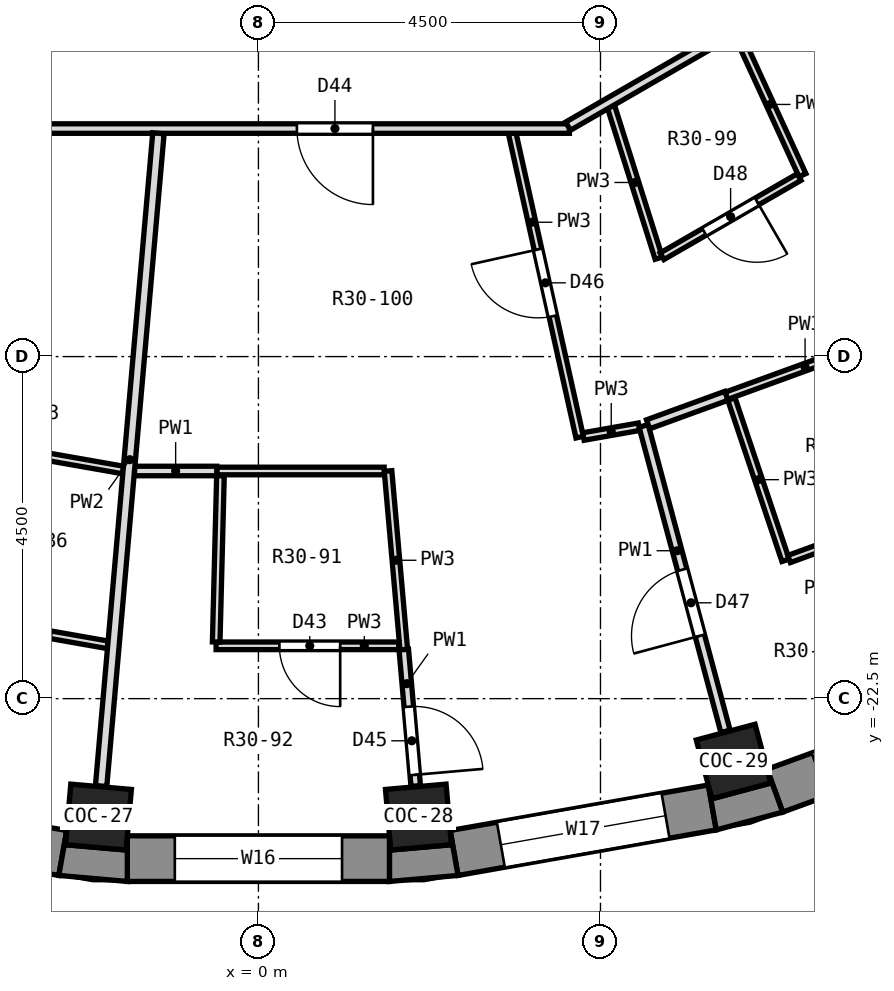
"""IFC4 building model, lengths in metres.
Left out: names, types, materials, properties, quantities, classifications, styles, units other than length and angle.
Written with IfcOpenShell. Run it as: python <this file> out.ifc"""

import sys

from ifc_helpers import new_model, si_unit, direction, frame, frame_2d, origin, origin_2d, place, context, subcontext, project, spatial, polyline, rectangle, outline, extrude, element, fill, save


model = new_model("IFC4")
c1 = context("Model", 3, precision=1e-05, world=origin(), true_north=direction((0.0, 1.0)))
c2 = subcontext(c1, "Body", "Model", "MODEL_VIEW")
j1 = project(units=[si_unit("LENGTHUNIT", "METRE"), si_unit("PLANEANGLEUNIT", "RADIAN")], contexts=[c1])
p1 = place(None, origin())
s1 = spatial("IfcSite", under=j1, at=p1, CompositionType="ELEMENT")
p2 = place(p1, origin())
s2 = spatial("IfcBuilding", under=s1, at=p2, CompositionType="ELEMENT")
p3 = place(p2, frame((0.0, 0.0, 210.3)))
s3 = spatial("IfcBuildingStorey", under=s2, at=p3, CompositionType="ELEMENT", Elevation=210.3)
for number, where, z_axis, x_axis in (
    (1, (-2.105, -24.058, 0.0), (0.0, 0.0, 1.0), (-0.087, -0.996, 0.0)),
    (2, (2.105, -24.058, 0.0), (0.0, 0.0, 1.0), (0.087, -0.996, 0.0)),
    (3, (6.25, -23.327, 0.0), (0.0, 0.0, 1.0), (0.259, -0.966, 0.0)),
):
    element("IfcColumn", number, at=place(p3, frame(where, z_axis=z_axis, x_axis=x_axis)), inside=s3, PredefinedType="COLUMN", context=c2, shape_type="SweptSolid", body=[
        extrude(rectangle(XDim=0.8, YDim=0.8, at=origin_2d()), origin(), (0.0, 0.0, 1.0), 3.3),
    ])
p4 = place(p3, frame((-5.971, -23.932, 0.0), z_axis=(0.0, 0.0, 1.0), x_axis=(0.984814892183, -0.173607684551, 0.0)))
e4 = element("IfcWall", 4, at=p4, inside=s3, PredefinedType="SOLIDWALL", context=c2, shape_type="SweptSolid", body=[
    extrude(rectangle(XDim=3.45, YDim=0.6, at=frame_2d((1.725, 0.0))), origin(), (0.0, 0.0, 1.0), 2.85),
])
p5 = place(p4, frame((0.625, 0.0, 0.9)))
e5 = element("IfcOpeningElement", 5, at=p5, cuts=e4, PredefinedType="OPENING", context=c2, shape_type="SweptSolid", body=[
    extrude(rectangle(XDim=2.2, YDim=1.8, at=frame_2d((1.1, 0.9))), frame((0.0, 0.312, 0.0), z_axis=(0.0, -1.0, 0.0), x_axis=(1.0, 0.0, 0.0)), (0.0, 0.0, 1.0), 0.624),
])
p6 = place(p3, frame((-1.725, -24.605, 0.0), z_axis=(0.0, 0.0, 1.0), x_axis=(1.0, 0.0, 0.0)))
e6 = element("IfcWall", 6, at=p6, inside=s3, PredefinedType="SOLIDWALL", context=c2, shape_type="SweptSolid", body=[
    extrude(rectangle(XDim=3.45, YDim=0.6, at=frame_2d((1.725, 0.0))), origin(), (0.0, 0.0, 1.0), 2.85),
])
p7 = place(p6, frame((0.625, 0.0, 0.9)))
e7 = element("IfcOpeningElement", 7, at=p7, cuts=e6, PredefinedType="OPENING", context=c2, shape_type="SweptSolid", body=[
    extrude(rectangle(XDim=2.2, YDim=1.8, at=frame_2d((1.1, 0.9))), frame((0.0, 0.312, 0.0), z_axis=(0.0, -1.0, 0.0), x_axis=(1.0, 0.0, 0.0)), (0.0, 0.0, 1.0), 0.624),
])
p8 = place(p3, frame((2.574, -24.531, 0.0), z_axis=(0.0, 0.0, 1.0), x_axis=(0.984814892183, 0.173607684551, 0.0)))
e8 = element("IfcWall", 8, at=p8, inside=s3, PredefinedType="SOLIDWALL", context=c2, shape_type="SweptSolid", body=[
    extrude(rectangle(XDim=3.45, YDim=0.6, at=frame_2d((1.725, 0.0))), origin(), (0.0, 0.0, 1.0), 2.85),
])
p9 = place(p8, frame((0.625, 0.0, 0.9)))
e9 = element("IfcOpeningElement", 9, at=p9, cuts=e8, PredefinedType="OPENING", context=c2, shape_type="SweptSolid", body=[
    extrude(rectangle(XDim=2.2, YDim=1.8, at=frame_2d((1.1, 0.9))), frame((0.0, 0.312, 0.0), z_axis=(0.0, -1.0, 0.0), x_axis=(1.0, 0.0, 0.0)), (0.0, 0.0, 1.0), 0.624),
])
p10 = place(p3, frame((6.794, -23.711, 0.0), z_axis=(0.0, 0.0, 1.0), x_axis=(0.93968799822, 0.342032843455, 0.0)))
e10 = element("IfcWall", 10, at=p10, inside=s3, PredefinedType="SOLIDWALL", context=c2, shape_type="SweptSolid", body=[
    extrude(rectangle(XDim=3.45, YDim=0.6, at=frame_2d((1.725, 0.0))), origin(), (0.0, 0.0, 1.0), 2.85),
])
p11 = place(p10, frame((0.625, 0.0, 0.9)))
e11 = element("IfcOpeningElement", 11, at=p11, cuts=e10, PredefinedType="OPENING", context=c2, shape_type="SweptSolid", body=[
    extrude(rectangle(XDim=2.2, YDim=1.8, at=frame_2d((1.1, 0.9))), frame((0.0, 0.312, 0.0), z_axis=(0.0, -1.0, 0.0), x_axis=(1.0, 0.0, 0.0)), (0.0, 0.0, 1.0), 0.624),
])
p12 = place(p3, origin())
e12 = element("IfcWall", 12, at=p12, inside=s3, PredefinedType="SOLIDWALL", context=c2, shape_type="SweptSolid", body=[
    extrude(outline(polyline([(-2.626, -24.826), (-1.725, -24.905), (-1.725, -24.305), (-1.741, -24.491), (-2.538, -24.422), (-2.522, -24.235), (-2.626, -24.826)])), origin(), (0.0, 0.0, 1.0), 2.85),
])
p13 = place(p3, origin())
e13 = element("IfcWall", 13, at=p13, inside=s3, PredefinedType="SOLIDWALL", context=c2, shape_type="SweptSolid", body=[
    extrude(outline(polyline([(1.725, -24.905), (2.626, -24.826), (2.522, -24.235), (2.538, -24.422), (1.741, -24.491), (1.725, -24.305), (1.725, -24.905)])), origin(), (0.0, 0.0, 1.0), 2.85),
])
p14 = place(p3, origin())
e14 = element("IfcWall", 14, at=p14, inside=s3, PredefinedType="SOLIDWALL", context=c2, shape_type="SweptSolid", body=[
    extrude(outline(polyline([(6.023, -24.227), (6.897, -23.993), (6.692, -23.429), (6.74, -23.61), (5.968, -23.817), (5.919, -23.636), (6.023, -24.227)])), origin(), (0.0, 0.0, 1.0), 2.85),
])
p15 = place(p3, frame((1.705, -19.505, 0.0), z_axis=(0.0, 0.0, 1.0), x_axis=(0.087875685813, -0.996131449078, 0.0)))
e15 = element("IfcWall", 15, at=p15, inside=s3, PredefinedType="PARTITIONING", context=c2, shape_type="SweptSolid", body=[
    extrude(rectangle(XDim=2.359, YDim=0.1, at=frame_2d((1.179, 0.0))), origin(), (0.0, 0.0, 1.0), 2.85),
])
p16 = place(p3, frame((1.912, -21.855, 0.0), z_axis=(0.0, 0.0, 1.0), x_axis=(0.08726107822, -0.99618547682, 0.0)))
e16 = element("IfcWall", 16, at=p16, inside=s3, PredefinedType="PARTITIONING", context=c2, shape_type="SweptSolid", body=[
    extrude(rectangle(XDim=1.802, YDim=0.125, at=frame_2d((0.901, 0.0))), origin(), (0.0, 0.0, 1.0), 2.85),
])
p17 = place(p16, frame((0.754, 0.0, 0.0)))
e17 = element("IfcOpeningElement", 17, at=p17, cuts=e16, PredefinedType="OPENING", context=c2, shape_type="SweptSolid", body=[
    extrude(rectangle(XDim=0.9, YDim=2.1, at=frame_2d((0.45, 1.05))), frame((0.0, 0.074, 0.0), z_axis=(0.0, -1.0, 0.0), x_axis=(1.0, 0.0, 0.0)), (0.0, 0.0, 1.0), 0.149),
])
p18 = place(p3, frame((3.338, -15.061, 0.0), z_axis=(0.0, 0.0, 1.0), x_axis=(0.216772684832, -0.976222107469, 0.0)))
e18 = element("IfcWall", 18, at=p18, inside=s3, PredefinedType="PARTITIONING", context=c2, shape_type="SweptSolid", body=[
    extrude(rectangle(XDim=4.096, YDim=0.1, at=frame_2d((2.048, 0.0))), origin(), (0.0, 0.0, 1.0), 2.85),
])
p19 = place(p18, frame((1.566, 0.0, 0.0)))
e19 = element("IfcOpeningElement", 19, at=p19, cuts=e18, PredefinedType="OPENING", context=c2, shape_type="SweptSolid", body=[
    extrude(rectangle(XDim=0.9, YDim=2.1, at=frame_2d((0.45, 1.05))), frame((0.0, 0.062, 0.0), z_axis=(0.0, -1.0, 0.0), x_axis=(1.0, 0.0, 0.0)), (0.0, 0.0, 1.0), 0.124),
])
p20 = place(p3, frame((5.068, -18.912, 0.0), z_axis=(0.0, 0.0, 1.0), x_axis=(0.258780082079, -0.965936265557, 0.0)))
e20 = element("IfcWall", 20, at=p20, inside=s3, PredefinedType="PARTITIONING", context=c2, shape_type="SweptSolid", body=[
    extrude(rectangle(XDim=4.16, YDim=0.125, at=frame_2d((2.08, 0.0))), origin(), (0.0, 0.0, 1.0), 2.85),
])
p21 = place(p20, frame((1.959, 0.0, 0.0)))
e21 = element("IfcOpeningElement", 21, at=p21, cuts=e20, PredefinedType="OPENING", context=c2, shape_type="SweptSolid", body=[
    extrude(rectangle(XDim=0.9, YDim=2.1, at=frame_2d((0.45, 1.05))), frame((0.0, 0.074, 0.0), z_axis=(0.0, -1.0, 0.0), x_axis=(1.0, 0.0, 0.0)), (0.0, 0.0, 1.0), 0.149),
])
p22 = place(p3, frame((4.639, -14.713, 0.0), z_axis=(0.0, 0.0, 1.0), x_axis=(0.300689491928, -0.953722092354, 0.0)))
e22 = element("IfcWall", 22, at=p22, inside=s3, PredefinedType="PARTITIONING", context=c2, shape_type="SweptSolid", body=[
    extrude(rectangle(XDim=2.089, YDim=0.1, at=frame_2d((1.044, 0.0))), origin(), (0.0, 0.0, 1.0), 2.85),
])
p23 = place(p3, frame((6.223, -18.558, 0.0), z_axis=(0.0, 0.0, 1.0), x_axis=(0.318223462583, -0.948015731864, 0.0)))
e23 = element("IfcWall", 23, at=p23, inside=s3, PredefinedType="PARTITIONING", context=c2, shape_type="SweptSolid", body=[
    extrude(rectangle(XDim=2.238, YDim=0.1, at=frame_2d((1.119, 0.0))), origin(), (0.0, 0.0, 1.0), 2.85),
])
p24 = place(p3, frame((6.304, -13.753, 0.0), z_axis=(0.0, 0.0, 1.0), x_axis=(0.41684777826, -0.90897630869, 0.0)))
e24 = element("IfcWall", 24, at=p24, inside=s3, PredefinedType="PARTITIONING", context=c2, shape_type="SweptSolid", body=[
    extrude(rectangle(XDim=2.046, YDim=0.1, at=frame_2d((1.023, 0.0))), origin(), (0.0, 0.0, 1.0), 2.85),
])
p25 = place(p3, frame((-4.335, -21.377, 0.0), z_axis=(0.0, 0.0, 1.0), x_axis=(0.984797956456, -0.173703727534, 0.0)))
e25 = element("IfcWall", 25, at=p25, inside=s3, PredefinedType="PARTITIONING", context=c2, shape_type="SweptSolid", body=[
    extrude(rectangle(XDim=2.389, YDim=0.1, at=frame_2d((1.195, 0.0))), origin(), (0.0, 0.0, 1.0), 2.85),
])
p26 = place(p25, frame((0.832, 0.0, 0.0)))
e26 = element("IfcOpeningElement", 26, at=p26, cuts=e25, PredefinedType="OPENING", context=c2, shape_type="SweptSolid", body=[
    extrude(rectangle(XDim=0.8, YDim=2.1, at=frame_2d((0.4, 1.05))), frame((0.0, 0.062, 0.0), z_axis=(0.0, -1.0, 0.0), x_axis=(1.0, 0.0, 0.0)), (0.0, 0.0, 1.0), 0.124),
])
p27 = place(p3, frame((-3.927, -19.115, 0.0), z_axis=(0.0, 0.0, 1.0), x_axis=(0.984911838823, -0.173056839643, 0.0)))
e27 = element("IfcWall", 27, at=p27, inside=s3, PredefinedType="PARTITIONING", context=c2, shape_type="SweptSolid", body=[
    extrude(rectangle(XDim=2.18, YDim=0.1, at=frame_2d((1.09, 0.0))), origin(), (0.0, 0.0, 1.0), 2.85),
])
p28 = place(p3, frame((-0.557, -21.805, 0.0), z_axis=(0.0, 0.0, 1.0), x_axis=(1.0, 0.0, 0.0)))
e28 = element("IfcWall", 28, at=p28, inside=s3, PredefinedType="PARTITIONING", context=c2, shape_type="SweptSolid", body=[
    extrude(rectangle(XDim=2.402, YDim=0.1, at=frame_2d((1.201, 0.0))), origin(), (0.0, 0.0, 1.0), 2.85),
])
p29 = place(p28, frame((0.833, 0.0, 0.0)))
e29 = element("IfcOpeningElement", 29, at=p29, cuts=e28, PredefinedType="OPENING", context=c2, shape_type="SweptSolid", body=[
    extrude(rectangle(XDim=0.8, YDim=2.1, at=frame_2d((0.4, 1.05))), frame((0.0, 0.062, 0.0), z_axis=(0.0, -1.0, 0.0), x_axis=(1.0, 0.0, 0.0)), (0.0, 0.0, 1.0), 0.124),
])
p30 = place(p3, frame((-0.548, -19.505, 0.0), z_axis=(0.0, 0.0, 1.0), x_axis=(1.0, 0.0, 0.0)))
e30 = element("IfcWall", 30, at=p30, inside=s3, PredefinedType="PARTITIONING", context=c2, shape_type="SweptSolid", body=[
    extrude(rectangle(XDim=2.202, YDim=0.1, at=frame_2d((1.101, 0.0))), origin(), (0.0, 0.0, 1.0), 2.85),
])
p31 = place(p3, frame((-1.63, -19.505, 0.0), z_axis=(0.0, 0.0, 1.0), x_axis=(1.0, 0.0, 0.0)))
e31 = element("IfcWall", 31, at=p31, inside=s3, PredefinedType="PARTITIONING", context=c2, shape_type="SweptSolid", body=[
    extrude(rectangle(XDim=1.082, YDim=0.125, at=frame_2d((0.541, 0.0))), origin(), (0.0, 0.0, 1.0), 2.85),
])
p32 = place(p3, frame((-3.957, -15.0, 0.0), z_axis=(0.0, 0.0, 1.0), x_axis=(1.0, 0.0, 0.0)))
e32 = element("IfcWall", 32, at=p32, inside=s3, PredefinedType="PARTITIONING", context=c2, shape_type="SweptSolid", body=[
    extrude(rectangle(XDim=8.048, YDim=0.125, at=frame_2d((4.024, 0.0))), origin(), (0.0, 0.0, 1.0), 2.85),
])
p33 = place(p32, frame((4.463, 0.0, 0.0)))
e33 = element("IfcOpeningElement", 33, at=p33, cuts=e32, PredefinedType="OPENING", context=c2, shape_type="SweptSolid", body=[
    extrude(rectangle(XDim=1.0, YDim=2.1, at=frame_2d((0.5, 1.05))), frame((0.0, 0.074, 0.0), z_axis=(0.0, -1.0, 0.0), x_axis=(1.0, 0.0, 0.0)), (0.0, 0.0, 1.0), 0.149),
])
p34 = place(p3, frame((4.276, -19.052, 0.0), z_axis=(0.0, 0.0, 1.0), x_axis=(0.984820011125, 0.173578644101, 0.0)))
e34 = element("IfcWall", 34, at=p34, inside=s3, PredefinedType="PARTITIONING", context=c2, shape_type="SweptSolid", body=[
    extrude(rectangle(XDim=0.741, YDim=0.1, at=frame_2d((0.371, 0.0))), origin(), (0.0, 0.0, 1.0), 2.85),
])
p35 = place(p3, frame((6.982, -20.663, 0.0), z_axis=(0.0, 0.0, 1.0), x_axis=(0.939639539443, 0.34216594792, 0.0)))
e35 = element("IfcWall", 35, at=p35, inside=s3, PredefinedType="PARTITIONING", context=c2, shape_type="SweptSolid", body=[
    extrude(rectangle(XDim=2.364, YDim=0.1, at=frame_2d((1.182, 0.0))), origin(), (0.0, 0.0, 1.0), 2.85),
])
p36 = place(p35, frame((0.782, 0.0, 0.0)))
e36 = element("IfcOpeningElement", 36, at=p36, cuts=e35, PredefinedType="OPENING", context=c2, shape_type="SweptSolid", body=[
    extrude(rectangle(XDim=0.8, YDim=2.1, at=frame_2d((0.4, 1.05))), frame((0.0, 0.062, 0.0), z_axis=(0.0, -1.0, 0.0), x_axis=(1.0, 0.0, 0.0)), (0.0, 0.0, 1.0), 0.124),
])
p37 = place(p3, frame((6.156, -18.516, 0.0), z_axis=(0.0, 0.0, 1.0), x_axis=(0.939728749343, 0.341920864613, 0.0)))
e37 = element("IfcWall", 37, at=p37, inside=s3, PredefinedType="PARTITIONING", context=c2, shape_type="SweptSolid", body=[
    extrude(rectangle(XDim=2.205, YDim=0.1, at=frame_2d((1.103, 0.0))), origin(), (0.0, 0.0, 1.0), 2.85),
])
p38 = place(p3, frame((5.127, -18.891, 0.0), z_axis=(0.0, 0.0, 1.0), x_axis=(0.939656692784, 0.342118838573, 0.0)))
e38 = element("IfcWall", 38, at=p38, inside=s3, PredefinedType="PARTITIONING", context=c2, shape_type="SweptSolid", body=[
    extrude(rectangle(XDim=1.095, YDim=0.125, at=frame_2d((0.548, 0.0))), origin(), (0.0, 0.0, 1.0), 2.85),
])
p39 = place(p3, frame((5.31, -16.68, 0.0), z_axis=(0.0, 0.0, 1.0), x_axis=(0.865867329874, 0.500273692149, 0.0)))
e39 = element("IfcWall", 39, at=p39, inside=s3, PredefinedType="PARTITIONING", context=c2, shape_type="SweptSolid", body=[
    extrude(rectangle(XDim=2.083, YDim=0.1, at=frame_2d((1.042, 0.0))), origin(), (0.0, 0.0, 1.0), 2.85),
])
p40 = place(p39, frame((0.641, 0.0, 0.0)))
e40 = element("IfcOpeningElement", 40, at=p40, cuts=e39, PredefinedType="OPENING", context=c2, shape_type="SweptSolid", body=[
    extrude(rectangle(XDim=0.8, YDim=2.1, at=frame_2d((0.4, 1.05))), frame((0.0, 0.062, 0.0), z_axis=(0.0, -1.0, 0.0), x_axis=(1.0, 0.0, 0.0)), (0.0, 0.0, 1.0), 0.124),
])
p41 = place(p3, frame((4.073, -14.969, 0.0), z_axis=(0.0, 0.0, 1.0), x_axis=(0.866056845741, 0.499945536979, 0.0)))
e41 = element("IfcWall", 41, at=p41, inside=s3, PredefinedType="PARTITIONING", context=c2, shape_type="SweptSolid", body=[
    extrude(rectangle(XDim=7.926, YDim=0.125, at=frame_2d((3.963, 0.0))), origin(), (0.0, 0.0, 1.0), 2.85),
])
p42 = place(p3, frame((-2.07, -23.65, 0.0), z_axis=(0.0, 0.0, 1.0), x_axis=(0.087486308122, 0.996165722102, 0.0)))
e42 = element("IfcWall", 42, at=p42, inside=s3, PredefinedType="PARTITIONING", context=c2, shape_type="SweptSolid", body=[
    extrude(rectangle(XDim=8.62, YDim=0.15, at=frame_2d((4.31, 0.0))), origin(), (0.0, 0.0, 1.0), 2.85),
])
p43 = place(p3, frame((-0.556, -21.755, 0.0), z_axis=(0.0, 0.0, 1.0), x_axis=(0.025658328011, 0.999670770906, 0.0)))
e43 = element("IfcWall", 43, at=p43, inside=s3, PredefinedType="PARTITIONING", context=c2, shape_type="SweptSolid", body=[
    extrude(rectangle(XDim=2.188, YDim=0.1, at=frame_2d((1.094, 0.0))), origin(), (0.0, 0.0, 1.0), 2.85),
])
p44 = place(p7, origin())
e44 = element("IfcWindow", 44, at=p44, inside=s3, PartitioningType="SINGLE_PANEL", PredefinedType="WINDOW", context=c2, shape_type="SweptSolid", body=[
    extrude(rectangle(XDim=2.2, YDim=1.8, at=frame_2d((1.1, 0.9))), frame((0.0, 0.18, 0.0), z_axis=(0.0, -1.0, 0.0), x_axis=(1.0, 0.0, 0.0)), (0.0, 0.0, 1.0), 0.06),
])
fill(e7, e44)
p45 = place(p9, origin())
e45 = element("IfcWindow", 45, at=p45, inside=s3, PartitioningType="SINGLE_PANEL", PredefinedType="WINDOW", context=c2, shape_type="SweptSolid", body=[
    extrude(rectangle(XDim=2.2, YDim=1.8, at=frame_2d((1.1, 0.9))), frame((0.0, 0.18, 0.0), z_axis=(0.0, -1.0, 0.0), x_axis=(1.0, 0.0, 0.0)), (0.0, 0.0, 1.0), 0.06),
])
fill(e9, e45)
p46 = place(p29, frame((0.8, 0.0, 0.0), z_axis=(0.0, 0.0, 1.0), x_axis=(-1.0, 0.0, 0.0)))
e46 = element("IfcDoor", 46, at=p46, inside=s3, OperationType="SINGLE_SWING_LEFT", PredefinedType="DOOR", context=c2, shape_type="SweptSolid", body=[
    extrude(rectangle(XDim=0.8, YDim=2.1, at=frame_2d((0.4, 1.05))), frame((0.0, 0.025, 0.0), z_axis=(0.0, -1.0, 0.0), x_axis=(1.0, 0.0, 0.0)), (0.0, 0.0, 1.0), 0.05),
])
fill(e29, e46)
p47 = place(p33, frame((1.0, 0.0, 0.0), z_axis=(0.0, 0.0, 1.0), x_axis=(-1.0, 0.0, 0.0)))
e47 = element("IfcDoor", 47, at=p47, inside=s3, OperationType="SINGLE_SWING_LEFT", PredefinedType="DOOR", context=c2, shape_type="SweptSolid", body=[
    extrude(rectangle(XDim=1.0, YDim=2.1, at=frame_2d((0.5, 1.05))), frame((0.0, 0.025, 0.0), z_axis=(0.0, -1.0, 0.0), x_axis=(1.0, 0.0, 0.0)), (0.0, 0.0, 1.0), 0.05),
])
fill(e33, e47)
p48 = place(p17, origin())
e48 = element("IfcDoor", 48, at=p48, inside=s3, OperationType="SINGLE_SWING_RIGHT", PredefinedType="DOOR", context=c2, shape_type="SweptSolid", body=[
    extrude(rectangle(XDim=0.9, YDim=2.1, at=frame_2d((0.45, 1.05))), frame((0.0, 0.025, 0.0), z_axis=(0.0, -1.0, 0.0), x_axis=(1.0, 0.0, 0.0)), (0.0, 0.0, 1.0), 0.05),
])
fill(e17, e48)
p49 = place(p19, frame((0.9, 0.0, 0.0), z_axis=(0.0, 0.0, 1.0), x_axis=(-1.0, 0.0, 0.0)))
e49 = element("IfcDoor", 49, at=p49, inside=s3, OperationType="SINGLE_SWING_RIGHT", PredefinedType="DOOR", context=c2, shape_type="SweptSolid", body=[
    extrude(rectangle(XDim=0.9, YDim=2.1, at=frame_2d((0.45, 1.05))), frame((0.0, 0.025, 0.0), z_axis=(0.0, -1.0, 0.0), x_axis=(1.0, 0.0, 0.0)), (0.0, 0.0, 1.0), 0.05),
])
fill(e19, e49)
p50 = place(p21, frame((0.9, 0.0, 0.0), z_axis=(0.0, 0.0, 1.0), x_axis=(-1.0, 0.0, 0.0)))
e50 = element("IfcDoor", 50, at=p50, inside=s3, OperationType="SINGLE_SWING_LEFT", PredefinedType="DOOR", context=c2, shape_type="SweptSolid", body=[
    extrude(rectangle(XDim=0.9, YDim=2.1, at=frame_2d((0.45, 1.05))), frame((0.0, 0.025, 0.0), z_axis=(0.0, -1.0, 0.0), x_axis=(1.0, 0.0, 0.0)), (0.0, 0.0, 1.0), 0.05),
])
fill(e21, e50)
p51 = place(p40, frame((0.8, 0.0, 0.0), z_axis=(0.0, 0.0, 1.0), x_axis=(-1.0, 0.0, 0.0)))
e51 = element("IfcDoor", 51, at=p51, inside=s3, OperationType="SINGLE_SWING_LEFT", PredefinedType="DOOR", context=c2, shape_type="SweptSolid", body=[
    extrude(rectangle(XDim=0.8, YDim=2.1, at=frame_2d((0.4, 1.05))), frame((0.0, 0.025, 0.0), z_axis=(0.0, -1.0, 0.0), x_axis=(1.0, 0.0, 0.0)), (0.0, 0.0, 1.0), 0.05),
])
fill(e40, e51)
save(model, sys.argv[1])
